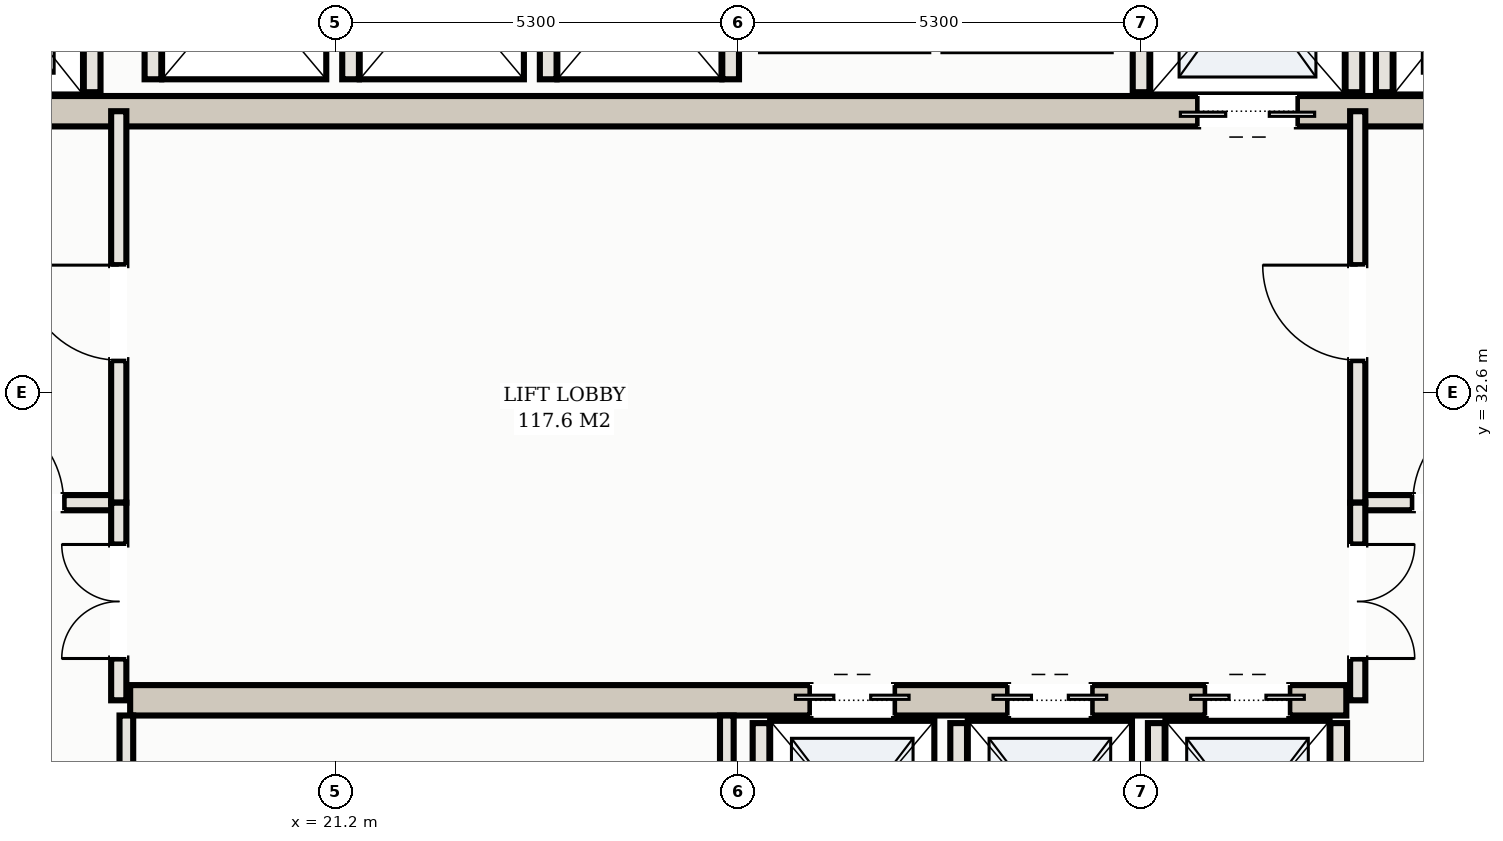
"""IFC4 building model, lengths in metres.
Left out: names, types, materials, properties, quantities, classifications, styles, units other than length and angle.
Written with IfcOpenShell. Run it as: python <this file> out.ifc"""

import sys

from ifc_helpers import new_model, si_unit, direction, frame, frame_2d, origin, place, context, subcontext, project, spatial, rectangle, extrude, element, fill, save


model = new_model("IFC4")
c1 = context("Model", 3, precision=1e-05, world=origin(), true_north=direction((0.0, 1.0)))
c2 = subcontext(c1, "Body", "Model", "MODEL_VIEW")
j1 = project(units=[si_unit("LENGTHUNIT", "METRE"), si_unit("PLANEANGLEUNIT", "RADIAN")], contexts=[c1])
p1 = place(None, origin())
s1 = spatial("IfcSite", under=j1, at=p1, CompositionType="ELEMENT")
p2 = place(p1, origin())
s2 = spatial("IfcBuilding", under=s1, at=p2, CompositionType="ELEMENT")
p3 = place(p2, frame((0.0, 0.0, 139.2)))
s3 = spatial("IfcBuildingStorey", under=s2, at=p3, CompositionType="ELEMENT", Elevation=139.2)
p4 = place(p3, frame((15.5, 36.3, 0.0), z_axis=(0.0, 0.0, 1.0), x_axis=(1.0, 0.0, 0.0)))
e1 = element("IfcWall", 1, at=p4, inside=s3, PredefinedType="SHEAR", context=c2, shape_type="SweptSolid", body=[
    extrude(rectangle(XDim=22.0, YDim=0.4, at=frame_2d((11.0, 0.0))), origin(), (0.0, 0.0, 1.0), 3.1),
])
p5 = place(p4, frame((0.65, 0.0, 0.0)))
e2 = element("IfcOpeningElement", 2, at=p5, cuts=e1, PredefinedType="OPENING", context=c2, shape_type="SweptSolid", body=[
    extrude(rectangle(XDim=1.1, YDim=2.15, at=frame_2d((0.55, 1.075))), frame((0.0, 0.21, 0.0), z_axis=(0.0, -1.0, 0.0), x_axis=(1.0, 0.0, 0.0)), (0.0, 0.0, 1.0), 0.42),
])
p6 = place(p4, frame((20.25, 0.0, 0.0)))
e3 = element("IfcOpeningElement", 3, at=p6, cuts=e1, PredefinedType="OPENING", context=c2, shape_type="SweptSolid", body=[
    extrude(rectangle(XDim=1.1, YDim=2.15, at=frame_2d((0.55, 1.075))), frame((0.0, 0.21, 0.0), z_axis=(0.0, -1.0, 0.0), x_axis=(1.0, 0.0, 0.0)), (0.0, 0.0, 1.0), 0.42),
])
p7 = place(p4, frame((17.05, 0.0, 0.0)))
e4 = element("IfcOpeningElement", 4, at=p7, cuts=e1, PredefinedType="OPENING", context=c2, shape_type="SweptSolid", body=[
    extrude(rectangle(XDim=1.3, YDim=2.2, at=frame_2d((0.65, 1.1))), frame((0.0, 0.21, 0.0), z_axis=(0.0, -1.0, 0.0), x_axis=(1.0, 0.0, 0.0)), (0.0, 0.0, 1.0), 0.42),
])
p8 = place(p3, frame((18.5, 28.55, 0.0), z_axis=(0.0, 0.0, 1.0), x_axis=(1.0, 0.0, 0.0)))
e5 = element("IfcWall", 5, at=p8, inside=s3, PredefinedType="SHEAR", context=c2, shape_type="SweptSolid", body=[
    extrude(rectangle(XDim=16.0, YDim=0.4, at=frame_2d((8.0, 0.0))), origin(), (0.0, 0.0, 1.0), 3.1),
])
p9 = place(p8, frame((8.95, 0.0, 0.0)))
e6 = element("IfcOpeningElement", 6, at=p9, cuts=e5, PredefinedType="OPENING", context=c2, shape_type="SweptSolid", body=[
    extrude(rectangle(XDim=1.1, YDim=2.15, at=frame_2d((0.55, 1.075))), frame((0.0, 0.21, 0.0), z_axis=(0.0, -1.0, 0.0), x_axis=(1.0, 0.0, 0.0)), (0.0, 0.0, 1.0), 0.42),
])
p10 = place(p8, frame((11.55, 0.0, 0.0)))
e7 = element("IfcOpeningElement", 7, at=p10, cuts=e5, PredefinedType="OPENING", context=c2, shape_type="SweptSolid", body=[
    extrude(rectangle(XDim=1.1, YDim=2.15, at=frame_2d((0.55, 1.075))), frame((0.0, 0.21, 0.0), z_axis=(0.0, -1.0, 0.0), x_axis=(1.0, 0.0, 0.0)), (0.0, 0.0, 1.0), 0.42),
])
p11 = place(p8, frame((14.15, 0.0, 0.0)))
e8 = element("IfcOpeningElement", 8, at=p11, cuts=e5, PredefinedType="OPENING", context=c2, shape_type="SweptSolid", body=[
    extrude(rectangle(XDim=1.1, YDim=2.15, at=frame_2d((0.55, 1.075))), frame((0.0, 0.21, 0.0), z_axis=(0.0, -1.0, 0.0), x_axis=(1.0, 0.0, 0.0)), (0.0, 0.0, 1.0), 0.42),
])
for number, where, z_axis, x_axis in (
    (9, (18.0, 36.55, 0.0), (0.0, 0.0, 1.0), (0.0, 1.0, 0.0)),
    (10, (35.0, 36.55, 0.0), (0.0, 0.0, 1.0), (0.0, 1.0, 0.0)),
    (11, (31.8, 36.55, 0.0), (0.0, 0.0, 1.0), (0.0, 1.0, 0.0)),
    (12, (34.6, 36.55, 0.0), (0.0, 0.0, 1.0), (0.0, 1.0, 0.0)),
):
    element("IfcWall", number, at=place(p3, frame(where, z_axis=z_axis, x_axis=x_axis)), inside=s3, PredefinedType="SOLIDWALL", context=c2, shape_type="SweptSolid", body=[
        extrude(rectangle(XDim=2.93, YDim=0.22, at=frame_2d((1.465, 0.0))), origin(), (0.0, 0.0, 1.0), 3.1),
    ])
for number, where, z_axis, x_axis in (
    (13, (26.8, 25.72, 0.0), (0.0, 0.0, 1.0), (0.0, 1.0, 0.0)),
    (14, (29.4, 25.72, 0.0), (0.0, 0.0, 1.0), (0.0, 1.0, 0.0)),
    (15, (32.0, 25.72, 0.0), (0.0, 0.0, 1.0), (0.0, 1.0, 0.0)),
    (16, (34.4, 25.72, 0.0), (0.0, 0.0, 1.0), (0.0, 1.0, 0.0)),
):
    element("IfcWall", number, at=place(p3, frame(where, z_axis=z_axis, x_axis=x_axis)), inside=s3, PredefinedType="SOLIDWALL", context=c2, shape_type="SweptSolid", body=[
        extrude(rectangle(XDim=2.53, YDim=0.22, at=frame_2d((1.265, 0.0))), origin(), (0.0, 0.0, 1.0), 3.1),
    ])
for number, where, z_axis, x_axis in (
    (17, (18.8, 36.72, 0.0), (0.0, 0.0, 1.0), (0.0, 1.0, 0.0)),
    (18, (21.4, 36.72, 0.0), (0.0, 0.0, 1.0), (0.0, 1.0, 0.0)),
    (19, (24.0, 36.72, 0.0), (0.0, 0.0, 1.0), (0.0, 1.0, 0.0)),
    (20, (26.4, 36.72, 0.0), (0.0, 0.0, 1.0), (0.0, 1.0, 0.0)),
):
    element("IfcWall", number, at=place(p3, frame(where, z_axis=z_axis, x_axis=x_axis)), inside=s3, PredefinedType="SOLIDWALL", context=c2, shape_type="SweptSolid", body=[
        extrude(rectangle(XDim=2.56, YDim=0.22, at=frame_2d((1.28, 0.0))), origin(), (0.0, 0.0, 1.0), 3.1),
    ])
p12 = place(p3, frame((15.1, 31.15, 0.0), z_axis=(0.0, 0.0, 1.0), x_axis=(1.0, 0.0, 0.0)))
e21 = element("IfcWall", 21, at=p12, inside=s3, PredefinedType="PARTITIONING", context=c2, shape_type="SweptSolid", body=[
    extrude(rectangle(XDim=3.25, YDim=0.2, at=frame_2d((1.625, 0.0))), origin(), (0.0, 0.0, 1.0), 2.38),
])
p13 = place(p12, frame((1.275, 0.0, 0.0)))
e22 = element("IfcOpeningElement", 22, at=p13, cuts=e21, PredefinedType="OPENING", context=c2, shape_type="SweptSolid", body=[
    extrude(rectangle(XDim=1.25, YDim=2.2, at=frame_2d((0.625, 1.1))), frame((0.0, 0.11, 0.0), z_axis=(0.0, -1.0, 0.0), x_axis=(1.0, 0.0, 0.0)), (0.0, 0.0, 1.0), 0.22),
])
p14 = place(p3, frame((18.35, 31.15, 0.0), z_axis=(0.0, 0.0, 1.0), x_axis=(0.0, 1.0, 0.0)))
e23 = element("IfcWall", 23, at=p14, inside=s3, PredefinedType="PARTITIONING", context=c2, shape_type="SweptSolid", body=[
    extrude(rectangle(XDim=5.15, YDim=0.2, at=frame_2d((2.575, 0.0))), origin(), (0.0, 0.0, 1.0), 2.38),
])
p15 = place(p14, frame((1.875, 0.0, 0.0)))
e24 = element("IfcOpeningElement", 24, at=p15, cuts=e23, PredefinedType="OPENING", context=c2, shape_type="SweptSolid", body=[
    extrude(rectangle(XDim=1.25, YDim=2.2, at=frame_2d((0.625, 1.1))), frame((0.0, 0.11, 0.0), z_axis=(0.0, -1.0, 0.0), x_axis=(1.0, 0.0, 0.0)), (0.0, 0.0, 1.0), 0.22),
])
p16 = place(p3, frame((34.65, 31.15, 0.0), z_axis=(0.0, 0.0, 1.0), x_axis=(1.0, 0.0, 0.0)))
e25 = element("IfcWall", 25, at=p16, inside=s3, PredefinedType="PARTITIONING", context=c2, shape_type="SweptSolid", body=[
    extrude(rectangle(XDim=3.25, YDim=0.2, at=frame_2d((1.625, 0.0))), origin(), (0.0, 0.0, 1.0), 2.38),
])
p17 = place(p16, frame((0.725, 0.0, 0.0)))
e26 = element("IfcOpeningElement", 26, at=p17, cuts=e25, PredefinedType="OPENING", context=c2, shape_type="SweptSolid", body=[
    extrude(rectangle(XDim=1.25, YDim=2.2, at=frame_2d((0.625, 1.1))), frame((0.0, 0.11, 0.0), z_axis=(0.0, -1.0, 0.0), x_axis=(1.0, 0.0, 0.0)), (0.0, 0.0, 1.0), 0.22),
])
p18 = place(p3, frame((34.65, 31.15, 0.0), z_axis=(0.0, 0.0, 1.0), x_axis=(0.0, 1.0, 0.0)))
e27 = element("IfcWall", 27, at=p18, inside=s3, PredefinedType="PARTITIONING", context=c2, shape_type="SweptSolid", body=[
    extrude(rectangle(XDim=5.15, YDim=0.2, at=frame_2d((2.575, 0.0))), origin(), (0.0, 0.0, 1.0), 2.38),
])
p19 = place(p18, frame((1.875, 0.0, 0.0)))
e28 = element("IfcOpeningElement", 28, at=p19, cuts=e27, PredefinedType="OPENING", context=c2, shape_type="SweptSolid", body=[
    extrude(rectangle(XDim=1.25, YDim=2.2, at=frame_2d((0.625, 1.1))), frame((0.0, 0.11, 0.0), z_axis=(0.0, -1.0, 0.0), x_axis=(1.0, 0.0, 0.0)), (0.0, 0.0, 1.0), 0.22),
])
p20 = place(p3, frame((18.35, 28.55, 0.0), z_axis=(0.0, 0.0, 1.0), x_axis=(0.0, 1.0, 0.0)))
e29 = element("IfcWall", 29, at=p20, inside=s3, PredefinedType="PARTITIONING", context=c2, shape_type="SweptSolid", body=[
    extrude(rectangle(XDim=2.6, YDim=0.2, at=frame_2d((1.3, 0.0))), origin(), (0.0, 0.0, 1.0), 2.38),
])
p21 = place(p20, frame((0.55, 0.0, 0.0)))
e30 = element("IfcOpeningElement", 30, at=p21, cuts=e29, PredefinedType="OPENING", context=c2, shape_type="SweptSolid", body=[
    extrude(rectangle(XDim=1.5, YDim=2.25, at=frame_2d((0.75, 1.125))), frame((0.0, 0.11, 0.0), z_axis=(0.0, -1.0, 0.0), x_axis=(1.0, 0.0, 0.0)), (0.0, 0.0, 1.0), 0.22),
])
p22 = place(p3, frame((34.65, 28.55, 0.0), z_axis=(0.0, 0.0, 1.0), x_axis=(0.0, 1.0, 0.0)))
e31 = element("IfcWall", 31, at=p22, inside=s3, PredefinedType="PARTITIONING", context=c2, shape_type="SweptSolid", body=[
    extrude(rectangle(XDim=2.6, YDim=0.2, at=frame_2d((1.3, 0.0))), origin(), (0.0, 0.0, 1.0), 2.38),
])
p23 = place(p22, frame((0.55, 0.0, 0.0)))
e32 = element("IfcOpeningElement", 32, at=p23, cuts=e31, PredefinedType="OPENING", context=c2, shape_type="SweptSolid", body=[
    extrude(rectangle(XDim=1.5, YDim=2.25, at=frame_2d((0.75, 1.125))), frame((0.0, 0.11, 0.0), z_axis=(0.0, -1.0, 0.0), x_axis=(1.0, 0.0, 0.0)), (0.0, 0.0, 1.0), 0.22),
])
for number, where, z_axis, x_axis in (
    (33, (18.45, 25.62, 0.0), (0.0, 0.0, 1.0), (0.0, 1.0, 0.0)),
    (34, (26.35, 25.62, 0.0), (0.0, 0.0, 1.0), (0.0, 1.0, 0.0)),
):
    element("IfcWall", number, at=place(p3, frame(where, z_axis=z_axis, x_axis=x_axis)), inside=s3, PredefinedType="PARTITIONING", context=c2, shape_type="SweptSolid", body=[
        extrude(rectangle(XDim=2.73, YDim=0.18, at=frame_2d((1.365, 0.0))), origin(), (0.0, 0.0, 1.0), 2.38),
    ])
p24 = place(p7, frame((1.3, 0.0, 0.0), z_axis=(0.0, 0.0, 1.0), x_axis=(-1.0, 0.0, 0.0)))
e35 = element("IfcDoor", 35, at=p24, inside=s3, OperationType="DOUBLE_DOOR_SLIDING", PredefinedType="DOOR", context=c2, shape_type="SweptSolid", body=[
    extrude(rectangle(XDim=1.3, YDim=2.2, at=frame_2d((0.65, 1.1))), frame((0.0, 0.025, 0.0), z_axis=(0.0, -1.0, 0.0), x_axis=(1.0, 0.0, 0.0)), (0.0, 0.0, 1.0), 0.05),
])
fill(e4, e35)
p25 = place(p9, origin())
e36 = element("IfcDoor", 36, at=p25, inside=s3, OperationType="DOUBLE_DOOR_SLIDING", PredefinedType="DOOR", context=c2, shape_type="SweptSolid", body=[
    extrude(rectangle(XDim=1.1, YDim=2.15, at=frame_2d((0.55, 1.075))), frame((0.0, 0.025, 0.0), z_axis=(0.0, -1.0, 0.0), x_axis=(1.0, 0.0, 0.0)), (0.0, 0.0, 1.0), 0.05),
])
fill(e6, e36)
p26 = place(p10, origin())
e37 = element("IfcDoor", 37, at=p26, inside=s3, OperationType="DOUBLE_DOOR_SLIDING", PredefinedType="DOOR", context=c2, shape_type="SweptSolid", body=[
    extrude(rectangle(XDim=1.1, YDim=2.15, at=frame_2d((0.55, 1.075))), frame((0.0, 0.025, 0.0), z_axis=(0.0, -1.0, 0.0), x_axis=(1.0, 0.0, 0.0)), (0.0, 0.0, 1.0), 0.05),
])
fill(e7, e37)
p27 = place(p11, origin())
e38 = element("IfcDoor", 38, at=p27, inside=s3, OperationType="DOUBLE_DOOR_SLIDING", PredefinedType="DOOR", context=c2, shape_type="SweptSolid", body=[
    extrude(rectangle(XDim=1.1, YDim=2.15, at=frame_2d((0.55, 1.075))), frame((0.0, 0.025, 0.0), z_axis=(0.0, -1.0, 0.0), x_axis=(1.0, 0.0, 0.0)), (0.0, 0.0, 1.0), 0.05),
])
fill(e8, e38)
p28 = place(p13, origin())
e39 = element("IfcDoor", 39, at=p28, inside=s3, OperationType="SINGLE_SWING_LEFT", PredefinedType="DOOR", context=c2, shape_type="SweptSolid", body=[
    extrude(rectangle(XDim=1.25, YDim=2.2, at=frame_2d((0.625, 1.1))), frame((0.0, 0.025, 0.0), z_axis=(0.0, -1.0, 0.0), x_axis=(1.0, 0.0, 0.0)), (0.0, 0.0, 1.0), 0.05),
])
fill(e22, e39)
p29 = place(p15, origin())
e40 = element("IfcDoor", 40, at=p29, inside=s3, OperationType="SINGLE_SWING_RIGHT", PredefinedType="DOOR", context=c2, shape_type="SweptSolid", body=[
    extrude(rectangle(XDim=1.25, YDim=2.2, at=frame_2d((0.625, 1.1))), frame((0.0, 0.025, 0.0), z_axis=(0.0, -1.0, 0.0), x_axis=(1.0, 0.0, 0.0)), (0.0, 0.0, 1.0), 0.05),
])
fill(e24, e40)
p30 = place(p17, origin())
e41 = element("IfcDoor", 41, at=p30, inside=s3, OperationType="SINGLE_SWING_RIGHT", PredefinedType="DOOR", context=c2, shape_type="SweptSolid", body=[
    extrude(rectangle(XDim=1.25, YDim=2.2, at=frame_2d((0.625, 1.1))), frame((0.0, 0.025, 0.0), z_axis=(0.0, -1.0, 0.0), x_axis=(1.0, 0.0, 0.0)), (0.0, 0.0, 1.0), 0.05),
])
fill(e26, e41)
p31 = place(p19, origin())
e42 = element("IfcDoor", 42, at=p31, inside=s3, OperationType="SINGLE_SWING_RIGHT", PredefinedType="DOOR", context=c2, shape_type="SweptSolid", body=[
    extrude(rectangle(XDim=1.25, YDim=2.2, at=frame_2d((0.625, 1.1))), frame((0.0, 0.025, 0.0), z_axis=(0.0, -1.0, 0.0), x_axis=(1.0, 0.0, 0.0)), (0.0, 0.0, 1.0), 0.05),
])
fill(e28, e42)
p32 = place(p21, origin())
e43 = element("IfcDoor", 43, at=p32, inside=s3, OperationType="DOUBLE_DOOR_SINGLE_SWING", PredefinedType="DOOR", context=c2, shape_type="SweptSolid", body=[
    extrude(rectangle(XDim=1.5, YDim=2.25, at=frame_2d((0.75, 1.125))), frame((0.0, 0.025, 0.0), z_axis=(0.0, -1.0, 0.0), x_axis=(1.0, 0.0, 0.0)), (0.0, 0.0, 1.0), 0.05),
])
fill(e30, e43)
p33 = place(p23, frame((1.5, 0.0, 0.0), z_axis=(0.0, 0.0, 1.0), x_axis=(-1.0, 0.0, 0.0)))
e44 = element("IfcDoor", 44, at=p33, inside=s3, OperationType="DOUBLE_DOOR_SINGLE_SWING", PredefinedType="DOOR", context=c2, shape_type="SweptSolid", body=[
    extrude(rectangle(XDim=1.5, YDim=2.25, at=frame_2d((0.75, 1.125))), frame((0.0, 0.025, 0.0), z_axis=(0.0, -1.0, 0.0), x_axis=(1.0, 0.0, 0.0)), (0.0, 0.0, 1.0), 0.05),
])
fill(e32, e44)
save(model, sys.argv[1])
